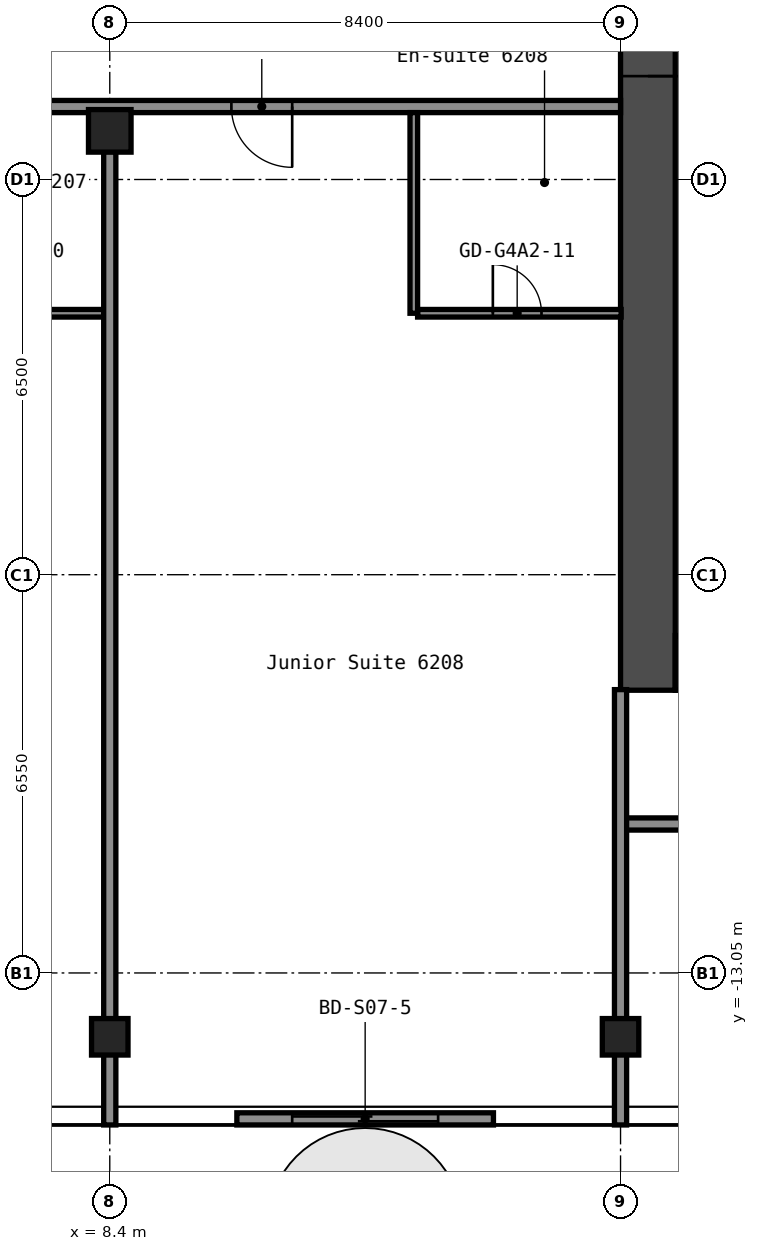
"""IFC4 building model, lengths in metres.
Left out: names, types, materials, properties, quantities, classifications, styles, units other than length and angle.
Written with IfcOpenShell. Run it as: python <this file> out.ifc"""

import sys

from ifc_helpers import new_model, si_unit, direction, frame, frame_2d, origin, origin_2d, place, context, subcontext, project, spatial, rectangle, hollow_rectangle, extrude, element, fill, save


model = new_model("IFC4")
c1 = context("Model", 3, precision=1e-05, world=origin(), true_north=direction((0.0, 1.0)))
c2 = subcontext(c1, "Body", "Model", "MODEL_VIEW")
j1 = project(units=[si_unit("LENGTHUNIT", "METRE"), si_unit("PLANEANGLEUNIT", "RADIAN")], contexts=[c1])
p1 = place(None, origin())
s1 = spatial("IfcSite", under=j1, at=p1, CompositionType="ELEMENT")
p2 = place(p1, origin())
s2 = spatial("IfcBuilding", under=s1, at=p2, CompositionType="ELEMENT")
p3 = place(p2, frame((0.0, 0.0, 218.6)))
s3 = spatial("IfcBuildingStorey", under=s2, at=p3, CompositionType="ELEMENT", Elevation=218.6)
p4 = place(p3, frame((8.4, -14.1, 0.0), z_axis=(0.0, 0.0, 1.0), x_axis=(1.0, 0.0, 0.0)))
e1 = element("IfcColumn", 1, at=p4, inside=s3, PredefinedType="COLUMN", context=c2, shape_type="SweptSolid", body=[
    extrude(hollow_rectangle(XDim=0.6, YDim=0.6, WallThickness=0.025, InnerFilletRadius=0.038, OuterFilletRadius=0.062, at=origin_2d()), origin(), (0.0, 0.0, 1.0), 2.75),
])
p5 = place(p3, frame((8.4, 0.8, 0.0), z_axis=(0.0, 0.0, 1.0), x_axis=(1.0, 0.0, 0.0)))
e2 = element("IfcColumn", 2, at=p5, inside=s3, PredefinedType="COLUMN", context=c2, shape_type="SweptSolid", body=[
    extrude(hollow_rectangle(XDim=0.7, YDim=0.7, WallThickness=0.028, at=origin_2d()), origin(), (0.0, 0.0, 1.0), 2.75),
])
p6 = place(p3, frame((16.8, -14.1, 0.0), z_axis=(0.0, 0.0, 1.0), x_axis=(1.0, 0.0, 0.0)))
e3 = element("IfcColumn", 3, at=p6, inside=s3, PredefinedType="COLUMN", context=c2, shape_type="SweptSolid", body=[
    extrude(hollow_rectangle(XDim=0.6, YDim=0.6, WallThickness=0.025, InnerFilletRadius=0.038, OuterFilletRadius=0.062, at=origin_2d()), origin(), (0.0, 0.0, 1.0), 2.75),
])
p7 = place(p3, frame((17.25, -8.4, 0.0), z_axis=(0.0, 0.0, 1.0), x_axis=(0.0, 1.0, 0.0)))
e4 = element("IfcWall", 4, at=p7, inside=s3, PredefinedType="SHEAR", context=c2, shape_type="SweptSolid", body=[
    extrude(rectangle(XDim=16.8, YDim=0.9, at=frame_2d((8.4, 0.0))), origin(), (0.0, 0.0, 1.0), 2.75),
])
p8 = place(p7, frame((10.1, 0.0, 0.0)))
e5 = element("IfcOpeningElement", 5, at=p8, cuts=e4, PredefinedType="OPENING", context=c2, shape_type="SweptSolid", body=[
    extrude(rectangle(XDim=1.6, YDim=2.1, at=frame_2d((0.8, 1.05))), frame((0.0, 0.46, 0.0), z_axis=(0.0, -1.0, 0.0), x_axis=(1.0, 0.0, 0.0)), (0.0, 0.0, 1.0), 0.92),
])
p9 = place(p3, frame((17.7, -7.95, 0.0), z_axis=(0.0, 0.0, 1.0), x_axis=(1.0, 0.0, 0.0)))
e6 = element("IfcWall", 6, at=p9, inside=s3, PredefinedType="SHEAR", context=c2, shape_type="SweptSolid", body=[
    extrude(rectangle(XDim=15.0, YDim=0.9, at=frame_2d((7.5, 0.0))), origin(), (0.0, 0.0, 1.0), 2.75),
])
p10 = place(p9, frame((2.55, 0.0, 0.0)))
e7 = element("IfcOpeningElement", 7, at=p10, cuts=e6, PredefinedType="OPENING", context=c2, shape_type="SweptSolid", body=[
    extrude(rectangle(XDim=1.0, YDim=2.1, at=frame_2d((0.5, 1.05))), frame((0.0, 0.46, 0.0), z_axis=(0.0, -1.0, 0.0), x_axis=(1.0, 0.0, 0.0)), (0.0, 0.0, 1.0), 0.92),
])
p11 = place(p3, frame((16.8, -10.6, 0.0), z_axis=(0.0, 0.0, 1.0), x_axis=(1.0, 0.0, 0.0)))
e8 = element("IfcWall", 8, at=p11, inside=s3, PredefinedType="PARTITIONING", context=c2, shape_type="SweptSolid", body=[
    extrude(rectangle(XDim=21.3, YDim=0.2, at=frame_2d((10.65, 0.0))), origin(), (0.0, 0.0, 1.0), 2.75),
])
p12 = place(p11, frame((3.7, 0.0, 0.0)))
e9 = element("IfcOpeningElement", 9, at=p12, cuts=e8, PredefinedType="OPENING", context=c2, shape_type="SweptSolid", body=[
    extrude(rectangle(XDim=1.0, YDim=2.1, at=frame_2d((0.5, 1.05))), frame((0.0, 0.11, 0.0), z_axis=(0.0, -1.0, 0.0), x_axis=(1.0, 0.0, 0.0)), (0.0, 0.0, 1.0), 0.22),
])
p13 = place(p11, frame((9.63, 0.0, 0.0)))
e10 = element("IfcOpeningElement", 10, at=p13, cuts=e8, PredefinedType="OPENING", context=c2, shape_type="SweptSolid", body=[
    extrude(rectangle(XDim=0.9, YDim=2.1, at=frame_2d((0.45, 1.05))), frame((0.0, 0.11, 0.0), z_axis=(0.0, -1.0, 0.0), x_axis=(1.0, 0.0, 0.0)), (0.0, 0.0, 1.0), 0.22),
])
p14 = place(p11, frame((13.83, 0.0, 0.0)))
e11 = element("IfcOpeningElement", 11, at=p14, cuts=e8, PredefinedType="OPENING", context=c2, shape_type="SweptSolid", body=[
    extrude(rectangle(XDim=0.9, YDim=2.1, at=frame_2d((0.45, 1.05))), frame((0.0, 0.11, 0.0), z_axis=(0.0, -1.0, 0.0), x_axis=(1.0, 0.0, 0.0)), (0.0, 0.0, 1.0), 0.22),
])
p15 = place(p11, frame((18.45, 0.0, 0.0)))
e12 = element("IfcOpeningElement", 12, at=p15, cuts=e8, PredefinedType="OPENING", context=c2, shape_type="SweptSolid", body=[
    extrude(rectangle(XDim=0.9, YDim=2.1, at=frame_2d((0.45, 1.05))), frame((0.0, 0.11, 0.0), z_axis=(0.0, -1.0, 0.0), x_axis=(1.0, 0.0, 0.0)), (0.0, 0.0, 1.0), 0.22),
])
p16 = place(p3, frame((5.062, -2.2, 0.0), z_axis=(0.0, 0.0, 1.0), x_axis=(1.0, 0.0, 0.0)))
e13 = element("IfcWall", 13, at=p16, inside=s3, PredefinedType="PARTITIONING", context=c2, shape_type="SweptSolid", body=[
    extrude(rectangle(XDim=3.238, YDim=0.125, at=frame_2d((1.619, 0.0))), origin(), (0.0, 0.0, 1.0), 2.75),
])
p17 = place(p16, frame((1.238, 0.0, 0.0)))
e14 = element("IfcOpeningElement", 14, at=p17, cuts=e13, PredefinedType="OPENING", context=c2, shape_type="SweptSolid", body=[
    extrude(rectangle(XDim=0.8, YDim=2.1, at=frame_2d((0.4, 1.05))), frame((0.0, 0.073, 0.0), z_axis=(0.0, -1.0, 0.0), x_axis=(1.0, 0.0, 0.0)), (0.0, 0.0, 1.0), 0.145),
])
p18 = place(p3, frame((13.462, -2.2, 0.0), z_axis=(0.0, 0.0, 1.0), x_axis=(1.0, 0.0, 0.0)))
e15 = element("IfcWall", 15, at=p18, inside=s3, PredefinedType="PARTITIONING", context=c2, shape_type="SweptSolid", body=[
    extrude(rectangle(XDim=3.348, YDim=0.125, at=frame_2d((1.674, 0.0))), origin(), (0.0, 0.0, 1.0), 2.75),
])
p19 = place(p18, frame((1.238, 0.0, 0.0)))
e16 = element("IfcOpeningElement", 16, at=p19, cuts=e15, PredefinedType="OPENING", context=c2, shape_type="SweptSolid", body=[
    extrude(rectangle(XDim=0.8, YDim=2.1, at=frame_2d((0.4, 1.05))), frame((0.0, 0.073, 0.0), z_axis=(0.0, -1.0, 0.0), x_axis=(1.0, 0.0, 0.0)), (0.0, 0.0, 1.0), 0.145),
])
p20 = place(p3, frame((-16.8, 1.2, 0.0), z_axis=(0.0, 0.0, 1.0), x_axis=(1.0, 0.0, 0.0)))
e17 = element("IfcWall", 17, at=p20, inside=s3, PredefinedType="PARTITIONING", context=c2, shape_type="SweptSolid", body=[
    extrude(rectangle(XDim=33.6, YDim=0.2, at=frame_2d((16.8, 0.0))), origin(), (0.0, 0.0, 1.0), 2.75),
])
p21 = place(p20, frame((2.0, 0.0, 0.0)))
e18 = element("IfcOpeningElement", 18, at=p21, cuts=e17, PredefinedType="OPENING", context=c2, shape_type="SweptSolid", body=[
    extrude(rectangle(XDim=1.0, YDim=2.1, at=frame_2d((0.5, 1.05))), frame((0.0, 0.11, 0.0), z_axis=(0.0, -1.0, 0.0), x_axis=(1.0, 0.0, 0.0)), (0.0, 0.0, 1.0), 0.22),
])
p22 = place(p20, frame((12.1, 0.0, 0.0)))
e19 = element("IfcOpeningElement", 19, at=p22, cuts=e17, PredefinedType="OPENING", context=c2, shape_type="SweptSolid", body=[
    extrude(rectangle(XDim=1.0, YDim=2.1, at=frame_2d((0.5, 1.05))), frame((0.0, 0.11, 0.0), z_axis=(0.0, -1.0, 0.0), x_axis=(1.0, 0.0, 0.0)), (0.0, 0.0, 1.0), 0.22),
])
p23 = place(p20, frame((18.8, 0.0, 0.0)))
e20 = element("IfcOpeningElement", 20, at=p23, cuts=e17, PredefinedType="OPENING", context=c2, shape_type="SweptSolid", body=[
    extrude(rectangle(XDim=1.0, YDim=2.1, at=frame_2d((0.5, 1.05))), frame((0.0, 0.11, 0.0), z_axis=(0.0, -1.0, 0.0), x_axis=(1.0, 0.0, 0.0)), (0.0, 0.0, 1.0), 0.22),
])
p24 = place(p20, frame((27.2, 0.0, 0.0)))
e21 = element("IfcOpeningElement", 21, at=p24, cuts=e17, PredefinedType="OPENING", context=c2, shape_type="SweptSolid", body=[
    extrude(rectangle(XDim=1.0, YDim=2.1, at=frame_2d((0.5, 1.05))), frame((0.0, 0.11, 0.0), z_axis=(0.0, -1.0, 0.0), x_axis=(1.0, 0.0, 0.0)), (0.0, 0.0, 1.0), 0.22),
])
p25 = place(p3, frame((8.4, -15.55, 0.0), z_axis=(0.0, 0.0, 1.0), x_axis=(0.0, 1.0, 0.0)))
e22 = element("IfcWall", 22, at=p25, inside=s3, PredefinedType="PARTITIONING", context=c2, shape_type="SweptSolid", body=[
    extrude(rectangle(XDim=16.01, YDim=0.2, at=frame_2d((8.005, 0.0))), origin(), (0.0, 0.0, 1.0), 2.75),
])
p26 = place(p3, frame((13.4, -2.2, 0.0), z_axis=(0.0, 0.0, 1.0), x_axis=(0.0, 1.0, 0.0)))
e23 = element("IfcWall", 23, at=p26, inside=s3, PredefinedType="PARTITIONING", context=c2, shape_type="SweptSolid", body=[
    extrude(rectangle(XDim=3.3, YDim=0.125, at=frame_2d((1.65, 0.0))), origin(), (0.0, 0.0, 1.0), 2.75),
])
p27 = place(p3, frame((16.8, -15.55, 0.0), z_axis=(0.0, 0.0, 1.0), x_axis=(0.0, 1.0, 0.0)))
e24 = element("IfcWall", 24, at=p27, inside=s3, PredefinedType="PARTITIONING", context=c2, shape_type="SweptSolid", body=[
    extrude(rectangle(XDim=7.16, YDim=0.2, at=frame_2d((3.58, 0.0))), origin(), (0.0, 0.0, 1.0), 2.75),
])
p28 = place(p3, frame((10.49, -15.45, 0.0), z_axis=(0.0, 0.0, 1.0), x_axis=(1.0, 0.0, 0.0)))
p29 = place(p28, frame((0.91, 0.0, 0.0)))
p30 = place(p29, frame((2.4, 0.0, 0.0), z_axis=(0.0, 0.0, 1.0), x_axis=(-1.0, 0.0, 0.0)))
e25 = element("IfcDoor", 25, at=p30, inside=s3, OperationType="SLIDING_TO_LEFT", PredefinedType="DOOR", context=c2, shape_type="SweptSolid", body=[
    extrude(rectangle(XDim=2.4, YDim=2.2, at=frame_2d((1.2, 1.1))), frame((0.0, 0.025, 0.0), z_axis=(0.0, -1.0, 0.0), x_axis=(1.0, 0.0, 0.0)), (0.0, 0.0, 1.0), 0.05),
])
p31 = place(p8, origin())
e26 = element("IfcDoor", 26, at=p31, inside=s3, OperationType="DOUBLE_DOOR_SINGLE_SWING", PredefinedType="DOOR", context=c2, shape_type="SweptSolid", body=[
    extrude(rectangle(XDim=1.6, YDim=2.1, at=frame_2d((0.8, 1.05))), frame((0.0, 0.025, 0.0), z_axis=(0.0, -1.0, 0.0), x_axis=(1.0, 0.0, 0.0)), (0.0, 0.0, 1.0), 0.05),
])
fill(e5, e26)
p32 = place(p19, origin())
e27 = element("IfcDoor", 27, at=p32, inside=s3, OperationType="SINGLE_SWING_RIGHT", PredefinedType="DOOR", context=c2, shape_type="SweptSolid", body=[
    extrude(rectangle(XDim=0.8, YDim=2.1, at=frame_2d((0.4, 1.05))), frame((0.0, 0.025, 0.0), z_axis=(0.0, -1.0, 0.0), x_axis=(1.0, 0.0, 0.0)), (0.0, 0.0, 1.0), 0.05),
])
fill(e16, e27)
p33 = place(p24, origin())
e28 = element("IfcDoor", 28, at=p33, inside=s3, OperationType="SINGLE_SWING_RIGHT", PredefinedType="DOOR", context=c2, shape_type="SweptSolid", body=[
    extrude(rectangle(XDim=1.0, YDim=2.1, at=frame_2d((0.5, 1.05))), frame((0.0, 0.025, 0.0), z_axis=(0.0, -1.0, 0.0), x_axis=(1.0, 0.0, 0.0)), (0.0, 0.0, 1.0), 0.05),
])
fill(e21, e28)
save(model, sys.argv[1])
